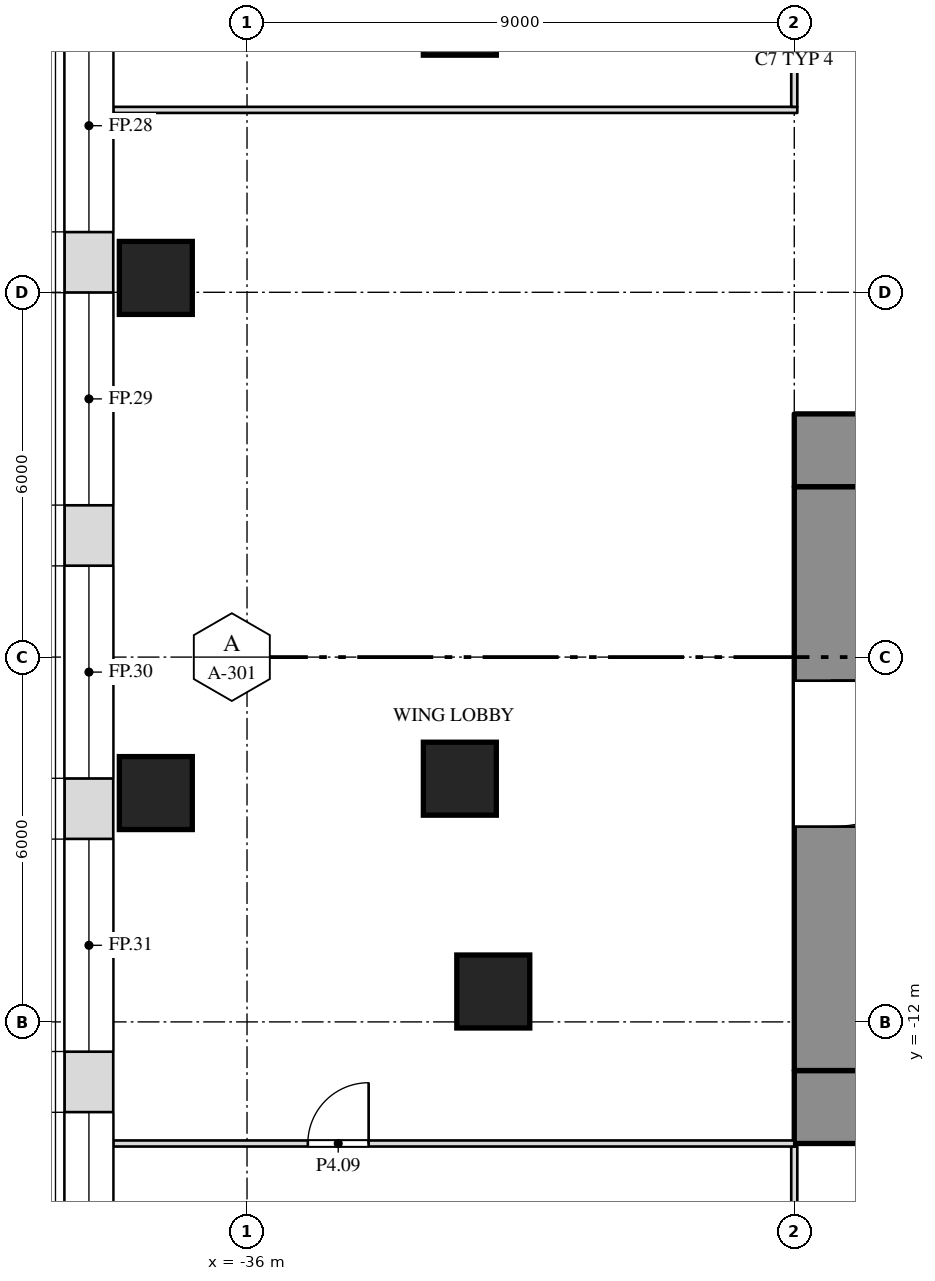
"""IFC4 building model, lengths in metres.
Left out: names, types, materials, properties, quantities, classifications, styles, units other than length and angle.
Written with IfcOpenShell. Run it as: python <this file> out.ifc"""

import sys

from ifc_helpers import new_model, si_unit, direction, frame, frame_2d, origin, origin_2d, place, context, subcontext, project, spatial, rectangle, extrude, element, fill, save


model = new_model("IFC4")
c1 = context("Model", 3, precision=1e-05, world=origin(), true_north=direction((0.0, 1.0)))
c2 = subcontext(c1, "Body", "Model", "MODEL_VIEW")
j1 = project(units=[si_unit("LENGTHUNIT", "METRE"), si_unit("PLANEANGLEUNIT", "RADIAN")], contexts=[c1])
p1 = place(None, origin())
s1 = spatial("IfcSite", under=j1, at=p1, CompositionType="ELEMENT")
p2 = place(p1, origin())
s2 = spatial("IfcBuilding", under=s1, at=p2, CompositionType="ELEMENT")
p3 = place(p2, frame((0.0, 0.0, 27.0)))
s3 = spatial("IfcBuildingStorey", under=s2, at=p3, CompositionType="ELEMENT", Elevation=27.0)
for number, where, z_axis, x_axis in (
    (1, (-31.95, -11.5, 0.0), (0.0, 0.0, 1.0), (1.0, 0.0, 0.0)),
    (2, (-37.5, -8.236, 0.0), (0.0, 0.0, 1.0), (1.0, 0.0, 0.0)),
    (3, (-32.5, -8.0, 0.0), (0.0, 0.0, 1.0), (1.0, 0.0, 0.0)),
    (4, (-37.5, 0.236, 0.0), (0.0, 0.0, 1.0), (1.0, 0.0, 0.0)),
    (5, (-32.5, 4.5, 0.0), (0.0, 0.0, 1.0), (1.0, 0.0, 0.0)),
):
    element("IfcColumn", number, at=place(p3, frame(where, z_axis=z_axis, x_axis=x_axis)), inside=s3, PredefinedType="COLUMN", context=c2, shape_type="SweptSolid", body=[
        extrude(rectangle(XDim=1.2, YDim=1.2, at=origin_2d()), origin(), (0.0, 0.0, 1.0), 6.0),
    ])
p4 = place(p3, frame((-27.0, -2.6, 0.0), z_axis=(0.0, 0.0, 1.0), x_axis=(1.0, 0.0, 0.0)))
e6 = element("IfcWall", 6, at=p4, inside=s3, PredefinedType="SHEAR", context=c2, shape_type="SweptSolid", body=[
    extrude(rectangle(XDim=54.0, YDim=1.2, at=frame_2d((27.0, 0.0))), origin(), (0.0, 0.0, 1.0), 5.7),
])
p5 = place(p3, frame((-27.0, -13.4, 0.0), z_axis=(0.0, 0.0, 1.0), x_axis=(1.0, 0.0, 0.0)))
e7 = element("IfcWall", 7, at=p5, inside=s3, PredefinedType="SHEAR", context=c2, shape_type="SweptSolid", body=[
    extrude(rectangle(XDim=54.0, YDim=1.2, at=frame_2d((27.0, 0.0))), origin(), (0.0, 0.0, 1.0), 5.7),
])
p6 = place(p5, frame((16.45, 0.0, 0.0)))
e8 = element("IfcOpeningElement", 8, at=p6, cuts=e7, PredefinedType="OPENING", context=c2, shape_type="SweptSolid", body=[
    extrude(rectangle(XDim=1.0, YDim=2.1, at=frame_2d((0.5, 1.05))), frame((0.0, 0.612, 0.0), z_axis=(0.0, -1.0, 0.0), x_axis=(1.0, 0.0, 0.0)), (0.0, 0.0, 1.0), 1.224),
])
p7 = place(p5, frame((36.55, 0.0, 0.0)))
e9 = element("IfcOpeningElement", 9, at=p7, cuts=e7, PredefinedType="OPENING", context=c2, shape_type="SweptSolid", body=[
    extrude(rectangle(XDim=1.0, YDim=2.1, at=frame_2d((0.5, 1.05))), frame((0.0, 0.612, 0.0), z_axis=(0.0, -1.0, 0.0), x_axis=(1.0, 0.0, 0.0)), (0.0, 0.0, 1.0), 1.224),
])
p8 = place(p3, frame((-26.4, -12.8, 0.0), z_axis=(0.0, 0.0, 1.0), x_axis=(0.0, 1.0, 0.0)))
e10 = element("IfcWall", 10, at=p8, inside=s3, PredefinedType="SHEAR", context=c2, shape_type="SweptSolid", body=[
    extrude(rectangle(XDim=9.6, YDim=1.2, at=frame_2d((4.8, 0.0))), origin(), (0.0, 0.0, 1.0), 5.7),
])
p9 = place(p8, frame((4.012, 0.0, 0.0)))
e11 = element("IfcOpeningElement", 11, at=p9, cuts=e10, PredefinedType="OPENING", context=c2, shape_type="SweptSolid", body=[
    extrude(rectangle(XDim=2.4, YDim=2.1, at=frame_2d((1.2, 1.05))), frame((0.0, 0.612, 0.0), z_axis=(0.0, -1.0, 0.0), x_axis=(1.0, 0.0, 0.0)), (0.0, 0.0, 1.0), 1.224),
])
p10 = place(p3, frame((-27.0, -16.9, 0.0), z_axis=(0.0, 0.0, 1.0), x_axis=(0.0, 1.0, 0.0)))
e12 = element("IfcWall", 12, at=p10, inside=s3, PredefinedType="PARTITIONING", context=c2, shape_type="SweptSolid", body=[
    extrude(rectangle(XDim=2.85, YDim=0.1, at=frame_2d((1.425, 0.0))), origin(), (0.0, 0.0, 1.0), 5.088),
])
p11 = place(p3, frame((-38.2, -14.0, 0.0), z_axis=(0.0, 0.0, 1.0), x_axis=(1.0, 0.0, 0.0)))
e13 = element("IfcWall", 13, at=p11, inside=s3, PredefinedType="PARTITIONING", context=c2, shape_type="SweptSolid", body=[
    extrude(rectangle(XDim=11.2, YDim=0.1, at=frame_2d((5.6, 0.0))), origin(), (0.0, 0.0, 1.0), 5.7),
])
p12 = place(p11, frame((3.2, 0.0, 0.0)))
e14 = element("IfcOpeningElement", 14, at=p12, cuts=e13, PredefinedType="OPENING", context=c2, shape_type="SweptSolid", body=[
    extrude(rectangle(XDim=1.0, YDim=2.1, at=frame_2d((0.5, 1.05))), frame((0.0, 0.062, 0.0), z_axis=(0.0, -1.0, 0.0), x_axis=(1.0, 0.0, 0.0)), (0.0, 0.0, 1.0), 0.124),
])
p13 = place(p3, frame((-38.2, 3.0, 0.0), z_axis=(0.0, 0.0, 1.0), x_axis=(1.0, 0.0, 0.0)))
e15 = element("IfcWall", 15, at=p13, inside=s3, PredefinedType="PARTITIONING", context=c2, shape_type="SweptSolid", body=[
    extrude(rectangle(XDim=11.25, YDim=0.1, at=frame_2d((5.625, 0.0))), origin(), (0.0, 0.0, 1.0), 5.7),
])
p14 = place(p3, frame((-27.0, 3.05, 0.0), z_axis=(0.0, 0.0, 1.0), x_axis=(0.0, 1.0, 0.0)))
e16 = element("IfcWall", 16, at=p14, inside=s3, PredefinedType="PARTITIONING", context=c2, shape_type="SweptSolid", body=[
    extrude(rectangle(XDim=1.166, YDim=0.1, at=frame_2d((0.583, 0.0))), origin(), (0.0, 0.0, 1.0), 5.088),
])
p15 = place(p3, frame((-38.6, 13.948, 0.0), z_axis=(0.0, 0.0, 1.0), x_axis=(0.0, -1.0, 0.0)))
e17 = element("IfcWall", 17, at=p15, inside=s3, PredefinedType="SOLIDWALL", context=c2, shape_type="SweptSolid", body=[
    extrude(rectangle(XDim=35.895, YDim=0.8, at=frame_2d((17.948, 0.0))), origin(), (0.0, 0.0, 1.0), 5.7),
])
p16 = place(p15, frame((4.964, 0.0, 1.0)))
e18 = element("IfcOpeningElement", 18, at=p16, cuts=e17, PredefinedType="OPENING", context=c2, shape_type="SweptSolid", body=[
    extrude(rectangle(XDim=3.5, YDim=4.0, at=frame_2d((1.75, 2.0))), frame((0.0, 0.412, 0.0), z_axis=(0.0, -1.0, 0.0), x_axis=(1.0, 0.0, 0.0)), (0.0, 0.0, 1.0), 0.824),
])
p17 = place(p15, frame((9.458, 0.0, 1.0)))
e19 = element("IfcOpeningElement", 19, at=p17, cuts=e17, PredefinedType="OPENING", context=c2, shape_type="SweptSolid", body=[
    extrude(rectangle(XDim=3.5, YDim=4.0, at=frame_2d((1.75, 2.0))), frame((0.0, 0.412, 0.0), z_axis=(0.0, -1.0, 0.0), x_axis=(1.0, 0.0, 0.0)), (0.0, 0.0, 1.0), 0.824),
])
p18 = place(p15, frame((13.951, 0.0, 1.0)))
e20 = element("IfcOpeningElement", 20, at=p18, cuts=e17, PredefinedType="OPENING", context=c2, shape_type="SweptSolid", body=[
    extrude(rectangle(XDim=3.5, YDim=4.0, at=frame_2d((1.75, 2.0))), frame((0.0, 0.412, 0.0), z_axis=(0.0, -1.0, 0.0), x_axis=(1.0, 0.0, 0.0)), (0.0, 0.0, 1.0), 0.824),
])
p19 = place(p15, frame((18.444, 0.0, 1.0)))
e21 = element("IfcOpeningElement", 21, at=p19, cuts=e17, PredefinedType="OPENING", context=c2, shape_type="SweptSolid", body=[
    extrude(rectangle(XDim=3.5, YDim=4.0, at=frame_2d((1.75, 2.0))), frame((0.0, 0.412, 0.0), z_axis=(0.0, -1.0, 0.0), x_axis=(1.0, 0.0, 0.0)), (0.0, 0.0, 1.0), 0.824),
])
p20 = place(p15, frame((22.938, 0.0, 1.0)))
e22 = element("IfcOpeningElement", 22, at=p20, cuts=e17, PredefinedType="OPENING", context=c2, shape_type="SweptSolid", body=[
    extrude(rectangle(XDim=3.5, YDim=4.0, at=frame_2d((1.75, 2.0))), frame((0.0, 0.412, 0.0), z_axis=(0.0, -1.0, 0.0), x_axis=(1.0, 0.0, 0.0)), (0.0, 0.0, 1.0), 0.824),
])
p21 = place(p15, frame((27.431, 0.0, 1.0)))
e23 = element("IfcOpeningElement", 23, at=p21, cuts=e17, PredefinedType="OPENING", context=c2, shape_type="SweptSolid", body=[
    extrude(rectangle(XDim=3.5, YDim=4.0, at=frame_2d((1.75, 2.0))), frame((0.0, 0.412, 0.0), z_axis=(0.0, -1.0, 0.0), x_axis=(1.0, 0.0, 0.0)), (0.0, 0.0, 1.0), 0.824),
])
p22 = place(p12, origin())
e24 = element("IfcDoor", 24, at=p22, inside=s3, OperationType="SINGLE_SWING_RIGHT", PredefinedType="DOOR", context=c2, shape_type="SweptSolid", body=[
    extrude(rectangle(XDim=1.0, YDim=2.1, at=frame_2d((0.5, 1.05))), frame((0.0, 0.025, 0.0), z_axis=(0.0, -1.0, 0.0), x_axis=(1.0, 0.0, 0.0)), (0.0, 0.0, 1.0), 0.05),
])
fill(e14, e24)
p23 = place(p17, origin())
e25 = element("IfcWindow", 25, at=p23, inside=s3, PartitioningType="SINGLE_PANEL", PredefinedType="WINDOW", context=c2, shape_type="SweptSolid", body=[
    extrude(rectangle(XDim=3.5, YDim=4.0, at=frame_2d((1.75, 2.0))), frame((0.0, 0.03, 0.0), z_axis=(0.0, -1.0, 0.0), x_axis=(1.0, 0.0, 0.0)), (0.0, 0.0, 1.0), 0.06),
])
fill(e19, e25)
p24 = place(p18, origin())
e26 = element("IfcWindow", 26, at=p24, inside=s3, PartitioningType="SINGLE_PANEL", PredefinedType="WINDOW", context=c2, shape_type="SweptSolid", body=[
    extrude(rectangle(XDim=3.5, YDim=4.0, at=frame_2d((1.75, 2.0))), frame((0.0, 0.03, 0.0), z_axis=(0.0, -1.0, 0.0), x_axis=(1.0, 0.0, 0.0)), (0.0, 0.0, 1.0), 0.06),
])
fill(e20, e26)
p25 = place(p19, origin())
e27 = element("IfcWindow", 27, at=p25, inside=s3, PartitioningType="SINGLE_PANEL", PredefinedType="WINDOW", context=c2, shape_type="SweptSolid", body=[
    extrude(rectangle(XDim=3.5, YDim=4.0, at=frame_2d((1.75, 2.0))), frame((0.0, 0.03, 0.0), z_axis=(0.0, -1.0, 0.0), x_axis=(1.0, 0.0, 0.0)), (0.0, 0.0, 1.0), 0.06),
])
fill(e21, e27)
p26 = place(p20, origin())
e28 = element("IfcWindow", 28, at=p26, inside=s3, PartitioningType="SINGLE_PANEL", PredefinedType="WINDOW", context=c2, shape_type="SweptSolid", body=[
    extrude(rectangle(XDim=3.5, YDim=4.0, at=frame_2d((1.75, 2.0))), frame((0.0, 0.03, 0.0), z_axis=(0.0, -1.0, 0.0), x_axis=(1.0, 0.0, 0.0)), (0.0, 0.0, 1.0), 0.06),
])
fill(e22, e28)
p27 = place(p21, origin())
e29 = element("IfcWindow", 29, at=p27, inside=s3, PartitioningType="SINGLE_PANEL", PredefinedType="WINDOW", context=c2, shape_type="SweptSolid", body=[
    extrude(rectangle(XDim=3.5, YDim=4.0, at=frame_2d((1.75, 2.0))), frame((0.0, 0.03, 0.0), z_axis=(0.0, -1.0, 0.0), x_axis=(1.0, 0.0, 0.0)), (0.0, 0.0, 1.0), 0.06),
])
fill(e23, e29)
p28 = place(p9, origin())
e30 = element("IfcDoor", 30, at=p28, inside=s3, OperationType="DOUBLE_DOOR_SINGLE_SWING", PredefinedType="DOOR", context=c2, shape_type="SweptSolid", body=[
    extrude(rectangle(XDim=2.4, YDim=2.1, at=frame_2d((1.2, 1.05))), frame((0.0, 0.025, 0.0), z_axis=(0.0, -1.0, 0.0), x_axis=(1.0, 0.0, 0.0)), (0.0, 0.0, 1.0), 0.05),
])
fill(e11, e30)
save(model, sys.argv[1])
